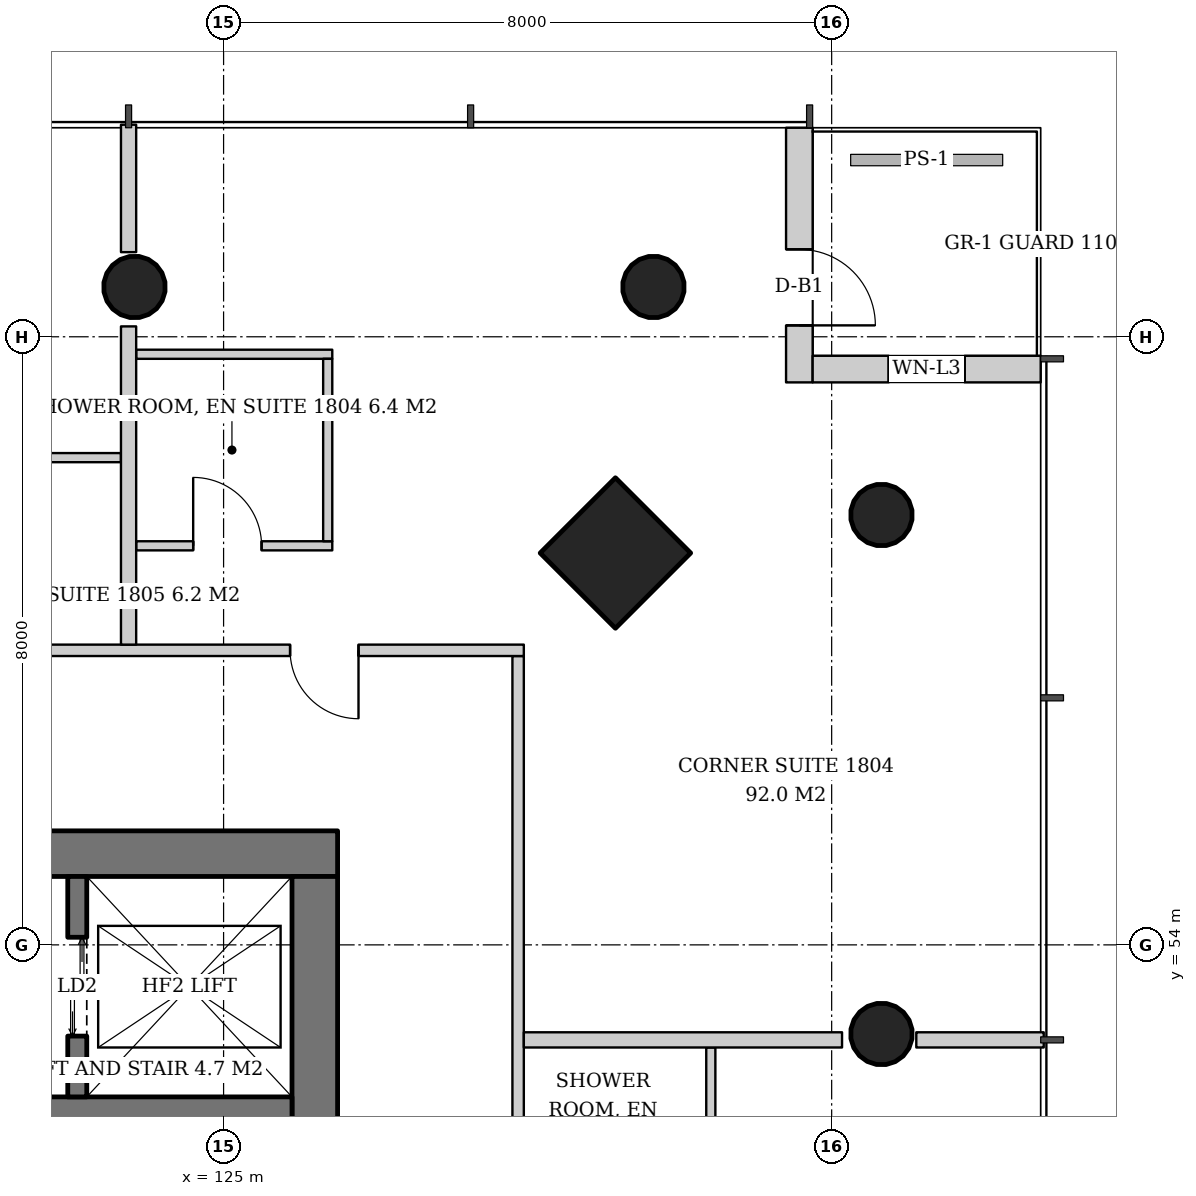
"""IFC4 building model, lengths in metres.
Left out: names, types, materials, properties, quantities, classifications, styles, units other than length and angle.
Written with IfcOpenShell. Run it as: python <this file> out.ifc"""

import sys

from ifc_helpers import new_model, si_unit, direction, frame, frame_2d, origin, origin_2d, place, context, subcontext, project, spatial, rectangle, hollow_circle, extrude, element, fill, save


model = new_model("IFC4")
c1 = context("Model", 3, precision=1e-05, world=origin(), true_north=direction((0.0, 1.0)))
c2 = subcontext(c1, "Body", "Model", "MODEL_VIEW")
j1 = project(units=[si_unit("LENGTHUNIT", "METRE"), si_unit("PLANEANGLEUNIT", "RADIAN")], contexts=[c1])
p1 = place(None, origin())
s1 = spatial("IfcSite", under=j1, at=p1, CompositionType="ELEMENT")
p2 = place(p1, origin())
s2 = spatial("IfcBuilding", under=s1, at=p2, CompositionType="ELEMENT")
p3 = place(p2, frame((0.0, 0.0, 74.2)))
s3 = spatial("IfcBuildingStorey", under=s2, at=p3, CompositionType="ELEMENT", Elevation=74.2)
p4 = place(p3, frame((130.207, 59.207, 0.0), z_axis=(-0.042965756413, -0.042965756413, 0.998152236661), x_axis=(0.707106781187, -0.707106781187, 0.0)))
e1 = element("IfcColumn", 1, at=p4, inside=s3, PredefinedType="COLUMN", context=c2, shape_type="SweptSolid", body=[
    extrude(rectangle(XDim=1.4, YDim=1.4, at=origin_2d()), origin(), (0.0, 0.0, 1.0), 3.807),
])
p5 = place(p3, frame((133.707, 59.707, 0.0), z_axis=(-0.042965756413, -0.042965756413, 0.998152236661), x_axis=(0.707106781187, -0.707106781187, 0.0)))
e2 = element("IfcColumn", 2, at=p5, inside=s3, PredefinedType="COLUMN", context=c2, shape_type="SweptSolid", body=[
    extrude(hollow_circle(Radius=0.406, WallThickness=0.03, at=origin_2d()), origin(), (0.0, 0.0, 1.0), 3.807),
])
p6 = place(p3, frame((133.707, 52.854, 0.0), z_axis=(-0.042995471882, -0.021561908287, 0.998842566929), x_axis=(0.448280611873, -0.89389288677, 0.0)))
e3 = element("IfcColumn", 3, at=p6, inside=s3, PredefinedType="COLUMN", context=c2, shape_type="SweptSolid", body=[
    extrude(hollow_circle(Radius=0.406, WallThickness=0.03, at=origin_2d()), origin(), (0.0, 0.0, 1.0), 3.804),
])
p7 = place(p3, frame((130.707, 62.707, 0.0), z_axis=(-0.042965756413, -0.042965756413, 0.998152236661), x_axis=(0.707106781187, -0.707106781187, 0.0)))
e4 = element("IfcColumn", 4, at=p7, inside=s3, PredefinedType="COLUMN", context=c2, shape_type="SweptSolid", body=[
    extrude(hollow_circle(Radius=0.406, WallThickness=0.03, at=origin_2d()), origin(), (0.0, 0.0, 1.0), 3.807),
])
p8 = place(p3, frame((123.854, 62.707, 0.0), z_axis=(-0.021561908287, -0.042995471882, 0.998842566929), x_axis=(0.89389288677, -0.448280611873, 0.0)))
e5 = element("IfcColumn", 5, at=p8, inside=s3, PredefinedType="COLUMN", context=c2, shape_type="SweptSolid", body=[
    extrude(hollow_circle(Radius=0.406, WallThickness=0.03, at=origin_2d()), origin(), (0.0, 0.0, 1.0), 3.804),
])
p9 = place(p3, frame((107.5, 55.2, 0.0), z_axis=(0.0, 0.0, 1.0), x_axis=(1.0, 0.0, 0.0)))
e6 = element("IfcWall", 6, at=p9, inside=s3, PredefinedType="SHEAR", context=c2, shape_type="SweptSolid", body=[
    extrude(rectangle(XDim=19.0, YDim=0.6, at=frame_2d((9.5, 0.0))), origin(), (0.0, 0.0, 1.0), 3.8),
])
p10 = place(p9, frame((14.14, 0.0, 0.0)))
e7 = element("IfcOpeningElement", 7, at=p10, cuts=e6, PredefinedType="OPENING", context=c2, shape_type="SweptSolid", body=[
    extrude(rectangle(XDim=1.0, YDim=2.1, at=frame_2d((0.5, 1.05))), frame((0.0, 0.31, 0.0), z_axis=(0.0, -1.0, 0.0), x_axis=(1.0, 0.0, 0.0)), (0.0, 0.0, 1.0), 0.62),
])
p11 = place(p9, frame((0.931, 0.0, 0.0)))
e8 = element("IfcOpeningElement", 8, at=p11, cuts=e6, PredefinedType="OPENING", context=c2, shape_type="SweptSolid", body=[
    extrude(rectangle(XDim=1.0, YDim=2.1, at=frame_2d((0.5, 1.05))), frame((0.0, 0.31, 0.0), z_axis=(0.0, -1.0, 0.0), x_axis=(1.0, 0.0, 0.0)), (0.0, 0.0, 1.0), 0.62),
])
p12 = place(p9, frame((2.448, 0.0, 0.0)))
e9 = element("IfcOpeningElement", 9, at=p12, cuts=e6, PredefinedType="OPENING", context=c2, shape_type="SweptSolid", body=[
    extrude(rectangle(XDim=1.0, YDim=2.1, at=frame_2d((0.5, 1.05))), frame((0.0, 0.31, 0.0), z_axis=(0.0, -1.0, 0.0), x_axis=(1.0, 0.0, 0.0)), (0.0, 0.0, 1.0), 0.62),
])
p13 = place(p9, frame((3.983, 0.0, 0.0)))
e10 = element("IfcOpeningElement", 10, at=p13, cuts=e6, PredefinedType="OPENING", context=c2, shape_type="SweptSolid", body=[
    extrude(rectangle(XDim=1.0, YDim=2.1, at=frame_2d((0.5, 1.05))), frame((0.0, 0.31, 0.0), z_axis=(0.0, -1.0, 0.0), x_axis=(1.0, 0.0, 0.0)), (0.0, 0.0, 1.0), 0.62),
])
p14 = place(p3, frame((126.2, 37.1, 0.0), z_axis=(0.0, 0.0, 1.0), x_axis=(0.0, 1.0, 0.0)))
e11 = element("IfcWall", 11, at=p14, inside=s3, PredefinedType="SHEAR", context=c2, shape_type="SweptSolid", body=[
    extrude(rectangle(XDim=17.8, YDim=0.6, at=frame_2d((8.9, 0.0))), origin(), (0.0, 0.0, 1.0), 3.8),
])
p15 = place(p14, frame((8.0, 0.0, 0.0)))
e12 = element("IfcOpeningElement", 12, at=p15, cuts=e11, PredefinedType="OPENING", context=c2, shape_type="SweptSolid", body=[
    extrude(rectangle(XDim=1.8, YDim=2.4, at=frame_2d((0.9, 1.2))), frame((0.0, 0.31, 0.0), z_axis=(0.0, -1.0, 0.0), x_axis=(1.0, 0.0, 0.0)), (0.0, 0.0, 1.0), 0.62),
])
p16 = place(p3, frame((108.1, 51.8, 0.0), z_axis=(0.0, 0.0, 1.0), x_axis=(1.0, 0.0, 0.0)))
e13 = element("IfcWall", 13, at=p16, inside=s3, PredefinedType="SHEAR", context=c2, shape_type="SweptSolid", body=[
    extrude(rectangle(XDim=17.8, YDim=0.4, at=frame_2d((8.9, 0.0))), origin(), (0.0, 0.0, 1.0), 3.8),
])
p17 = place(p3, frame((132.575, 64.75, 0.0), z_axis=(0.0, 0.0, 1.0), x_axis=(0.0, -1.0, 0.0)))
e14 = element("IfcWall", 14, at=p17, inside=s3, PredefinedType="SOLIDWALL", context=c2, shape_type="SweptSolid", body=[
    extrude(rectangle(XDim=3.35, YDim=0.35, at=frame_2d((1.675, 0.0))), origin(), (0.0, 0.0, 1.0), 3.6),
])
p18 = place(p17, frame((1.6, 0.0, 0.0)))
e15 = element("IfcOpeningElement", 15, at=p18, cuts=e14, PredefinedType="OPENING", context=c2, shape_type="SweptSolid", body=[
    extrude(rectangle(XDim=1.0, YDim=2.4, at=frame_2d((0.5, 1.2))), frame((0.0, 0.185, 0.0), z_axis=(0.0, -1.0, 0.0), x_axis=(1.0, 0.0, 0.0)), (0.0, 0.0, 1.0), 0.37),
])
p19 = place(p3, frame((132.75, 61.575, 0.0), z_axis=(0.0, 0.0, 1.0), x_axis=(1.0, 0.0, 0.0)))
e16 = element("IfcWall", 16, at=p19, inside=s3, PredefinedType="SOLIDWALL", context=c2, shape_type="SweptSolid", body=[
    extrude(rectangle(XDim=3.0, YDim=0.35, at=frame_2d((1.5, 0.0))), origin(), (0.0, 0.0, 1.0), 3.6),
])
p20 = place(p19, frame((1.0, 0.0, 0.9)))
e17 = element("IfcOpeningElement", 17, at=p20, cuts=e16, PredefinedType="OPENING", context=c2, shape_type="SweptSolid", body=[
    extrude(rectangle(XDim=1.0, YDim=2.4, at=frame_2d((0.5, 1.2))), frame((0.0, 0.185, 0.0), z_axis=(0.0, -1.0, 0.0), x_axis=(1.0, 0.0, 0.0)), (0.0, 0.0, 1.0), 0.37),
])
p21 = place(p3, frame((123.075, 52.0, 0.0), z_axis=(0.0, 0.0, 1.0), x_axis=(0.0, 1.0, 0.0)))
e18 = element("IfcWall", 18, at=p21, inside=s3, PredefinedType="SHEAR", context=c2, shape_type="SweptSolid", body=[
    extrude(rectangle(XDim=2.9, YDim=0.25, at=frame_2d((1.45, 0.0))), origin(), (0.0, 0.0, 1.0), 3.8),
])
p22 = place(p21, frame((0.8, 0.0, 0.0)))
e19 = element("IfcOpeningElement", 19, at=p22, cuts=e18, PredefinedType="OPENING", context=c2, shape_type="SweptSolid", body=[
    extrude(rectangle(XDim=1.3, YDim=2.2, at=frame_2d((0.65, 1.1))), frame((0.0, 0.135, 0.0), z_axis=(0.0, -1.0, 0.0), x_axis=(1.0, 0.0, 0.0)), (0.0, 0.0, 1.0), 0.27),
])
p23 = place(p3, frame((131.41, 49.93, 0.0), z_axis=(0.0, 0.0, 1.0), x_axis=(0.0, 1.0, 0.0)))
e20 = element("IfcWall", 20, at=p23, inside=s3, PredefinedType="PARTITIONING", context=c2, shape_type="SweptSolid", body=[
    extrude(rectangle(XDim=2.72, YDim=0.12, at=frame_2d((1.36, 0.0))), origin(), (0.0, 0.0, 1.0), 3.6),
])
p24 = place(p3, frame((128.875, 34.05, 0.0), z_axis=(0.0, 0.0, 1.0), x_axis=(0.0, 1.0, 0.0)))
e21 = element("IfcWall", 21, at=p24, inside=s3, PredefinedType="PARTITIONING", context=c2, shape_type="SweptSolid", body=[
    extrude(rectangle(XDim=23.75, YDim=0.15, at=frame_2d((11.875, 0.0))), origin(), (0.0, 0.0, 1.0), 2.8),
])
p25 = place(p24, frame((2.175, 0.0, 0.0)))
e22 = element("IfcOpeningElement", 22, at=p25, cuts=e21, PredefinedType="OPENING", context=c2, shape_type="SweptSolid", body=[
    extrude(rectangle(XDim=0.9, YDim=2.1, at=frame_2d((0.45, 1.05))), frame((0.0, 0.085, 0.0), z_axis=(0.0, -1.0, 0.0), x_axis=(1.0, 0.0, 0.0)), (0.0, 0.0, 1.0), 0.17),
])
p26 = place(p24, frame((7.95, 0.0, 0.0)))
e23 = element("IfcOpeningElement", 23, at=p26, cuts=e21, PredefinedType="OPENING", context=c2, shape_type="SweptSolid", body=[
    extrude(rectangle(XDim=0.9, YDim=2.1, at=frame_2d((0.45, 1.05))), frame((0.0, 0.085, 0.0), z_axis=(0.0, -1.0, 0.0), x_axis=(1.0, 0.0, 0.0)), (0.0, 0.0, 1.0), 0.17),
])
p27 = place(p24, frame((14.8, 0.0, 0.0)))
e24 = element("IfcOpeningElement", 24, at=p27, cuts=e21, PredefinedType="OPENING", context=c2, shape_type="SweptSolid", body=[
    extrude(rectangle(XDim=0.9, YDim=2.1, at=frame_2d((0.45, 1.05))), frame((0.0, 0.085, 0.0), z_axis=(0.0, -1.0, 0.0), x_axis=(1.0, 0.0, 0.0)), (0.0, 0.0, 1.0), 0.17),
])
p28 = place(p3, frame((128.95, 52.75, 0.0), z_axis=(0.0, 0.0, 1.0), x_axis=(1.0, 0.0, 0.0)))
e25 = element("IfcWall", 25, at=p28, inside=s3, PredefinedType="PARTITIONING", context=c2, shape_type="SweptSolid", body=[
    extrude(rectangle(XDim=4.187, YDim=0.2, at=frame_2d((2.093, 0.0))), origin(), (0.0, 0.0, 1.0), 3.6),
])
p29 = place(p3, frame((134.113, 52.75, 0.0), z_axis=(0.0, 0.0, 1.0), x_axis=(1.0, 0.0, 0.0)))
e26 = element("IfcWall", 26, at=p29, inside=s3, PredefinedType="PARTITIONING", context=c2, shape_type="SweptSolid", body=[
    extrude(rectangle(XDim=1.677, YDim=0.2, at=frame_2d((0.838, 0.0))), origin(), (0.0, 0.0, 1.0), 3.6),
])
p30 = place(p3, frame((123.85, 59.25, 0.0), z_axis=(0.0, 0.0, 1.0), x_axis=(1.0, 0.0, 0.0)))
e27 = element("IfcWall", 27, at=p30, inside=s3, PredefinedType="PARTITIONING", context=c2, shape_type="SweptSolid", body=[
    extrude(rectangle(XDim=2.58, YDim=0.12, at=frame_2d((1.29, 0.0))), origin(), (0.0, 0.0, 1.0), 2.8),
])
p31 = place(p30, frame((0.75, 0.0, 0.0)))
e28 = element("IfcOpeningElement", 28, at=p31, cuts=e27, PredefinedType="OPENING", context=c2, shape_type="SweptSolid", body=[
    extrude(rectangle(XDim=0.9, YDim=2.1, at=frame_2d((0.45, 1.05))), frame((0.0, 0.07, 0.0), z_axis=(0.0, -1.0, 0.0), x_axis=(1.0, 0.0, 0.0)), (0.0, 0.0, 1.0), 0.14),
])
p32 = place(p3, frame((123.85, 61.77, 0.0), z_axis=(0.0, 0.0, 1.0), x_axis=(1.0, 0.0, 0.0)))
e29 = element("IfcWall", 29, at=p32, inside=s3, PredefinedType="PARTITIONING", context=c2, shape_type="SweptSolid", body=[
    extrude(rectangle(XDim=2.58, YDim=0.12, at=frame_2d((1.29, 0.0))), origin(), (0.0, 0.0, 1.0), 2.8),
])
p33 = place(p3, frame((126.37, 59.31, 0.0), z_axis=(0.0, 0.0, 1.0), x_axis=(0.0, 1.0, 0.0)))
e30 = element("IfcWall", 30, at=p33, inside=s3, PredefinedType="PARTITIONING", context=c2, shape_type="SweptSolid", body=[
    extrude(rectangle(XDim=2.4, YDim=0.12, at=frame_2d((1.2, 0.0))), origin(), (0.0, 0.0, 1.0), 2.8),
])
p34 = place(p3, frame((123.65, 60.41, 0.0), z_axis=(0.0, 0.0, 1.0), x_axis=(-1.0, 0.0, 0.0)))
e31 = element("IfcWall", 31, at=p34, inside=s3, PredefinedType="PARTITIONING", context=c2, shape_type="SweptSolid", body=[
    extrude(rectangle(XDim=2.42, YDim=0.12, at=frame_2d((1.21, 0.0))), origin(), (0.0, 0.0, 1.0), 2.847),
])
p35 = place(p3, frame((128.95, 57.875, 0.0), z_axis=(0.0, 0.0, 1.0), x_axis=(-1.0, 0.0, 0.0)))
e32 = element("IfcWall", 32, at=p35, inside=s3, PredefinedType="PARTITIONING", context=c2, shape_type="SweptSolid", body=[
    extrude(rectangle(XDim=23.75, YDim=0.15, at=frame_2d((11.875, 0.0))), origin(), (0.0, 0.0, 1.0), 2.8),
])
p36 = place(p35, frame((2.175, 0.0, 0.0)))
e33 = element("IfcOpeningElement", 33, at=p36, cuts=e32, PredefinedType="OPENING", context=c2, shape_type="SweptSolid", body=[
    extrude(rectangle(XDim=0.9, YDim=2.1, at=frame_2d((0.45, 1.05))), frame((0.0, 0.085, 0.0), z_axis=(0.0, -1.0, 0.0), x_axis=(1.0, 0.0, 0.0)), (0.0, 0.0, 1.0), 0.17),
])
p37 = place(p35, frame((7.95, 0.0, 0.0)))
e34 = element("IfcOpeningElement", 34, at=p37, cuts=e32, PredefinedType="OPENING", context=c2, shape_type="SweptSolid", body=[
    extrude(rectangle(XDim=0.9, YDim=2.1, at=frame_2d((0.45, 1.05))), frame((0.0, 0.085, 0.0), z_axis=(0.0, -1.0, 0.0), x_axis=(1.0, 0.0, 0.0)), (0.0, 0.0, 1.0), 0.17),
])
p38 = place(p35, frame((16.95, 0.0, 0.0)))
e35 = element("IfcOpeningElement", 35, at=p38, cuts=e32, PredefinedType="OPENING", context=c2, shape_type="SweptSolid", body=[
    extrude(rectangle(XDim=0.9, YDim=2.1, at=frame_2d((0.45, 1.05))), frame((0.0, 0.085, 0.0), z_axis=(0.0, -1.0, 0.0), x_axis=(1.0, 0.0, 0.0)), (0.0, 0.0, 1.0), 0.17),
])
p39 = place(p3, frame((123.75, 57.95, 0.0), z_axis=(0.0, 0.0, 1.0), x_axis=(0.0, 1.0, 0.0)))
e36 = element("IfcWall", 36, at=p39, inside=s3, PredefinedType="PARTITIONING", context=c2, shape_type="SweptSolid", body=[
    extrude(rectangle(XDim=4.187, YDim=0.2, at=frame_2d((2.093, 0.0))), origin(), (0.0, 0.0, 1.0), 3.6),
])
p40 = place(p3, frame((123.75, 63.113, 0.0), z_axis=(0.0, 0.0, 1.0), x_axis=(0.0, 1.0, 0.0)))
e37 = element("IfcWall", 37, at=p40, inside=s3, PredefinedType="PARTITIONING", context=c2, shape_type="SweptSolid", body=[
    extrude(rectangle(XDim=1.677, YDim=0.2, at=frame_2d((0.838, 0.0))), origin(), (0.0, 0.0, 1.0), 3.6),
])
p41 = place(p18, origin())
e38 = element("IfcDoor", 38, at=p41, inside=s3, OperationType="SINGLE_SWING_RIGHT", PredefinedType="DOOR", context=c2, shape_type="SweptSolid", body=[
    extrude(rectangle(XDim=1.0, YDim=2.4, at=frame_2d((0.5, 1.2))), frame((0.0, 0.025, 0.0), z_axis=(0.0, -1.0, 0.0), x_axis=(1.0, 0.0, 0.0)), (0.0, 0.0, 1.0), 0.05),
])
fill(e15, e38)
p42 = place(p20, origin())
e39 = element("IfcWindow", 39, at=p42, inside=s3, PartitioningType="SINGLE_PANEL", PredefinedType="WINDOW", context=c2, shape_type="SweptSolid", body=[
    extrude(rectangle(XDim=1.0, YDim=2.4, at=frame_2d((0.5, 1.2))), frame((0.0, 0.03, 0.0), z_axis=(0.0, -1.0, 0.0), x_axis=(1.0, 0.0, 0.0)), (0.0, 0.0, 1.0), 0.06),
])
fill(e17, e39)
p43 = place(p22, origin())
e40 = element("IfcDoor", 40, at=p43, inside=s3, OperationType="DOUBLE_DOOR_SLIDING", PredefinedType="DOOR", context=c2, shape_type="SweptSolid", body=[
    extrude(rectangle(XDim=1.3, YDim=2.2, at=frame_2d((0.65, 1.1))), frame((0.0, 0.025, 0.0), z_axis=(0.0, -1.0, 0.0), x_axis=(1.0, 0.0, 0.0)), (0.0, 0.0, 1.0), 0.05),
])
fill(e19, e40)
p44 = place(p31, origin())
e41 = element("IfcDoor", 41, at=p44, inside=s3, OperationType="SINGLE_SWING_LEFT", PredefinedType="DOOR", context=c2, shape_type="SweptSolid", body=[
    extrude(rectangle(XDim=0.9, YDim=2.1, at=frame_2d((0.45, 1.05))), frame((0.0, 0.025, 0.0), z_axis=(0.0, -1.0, 0.0), x_axis=(1.0, 0.0, 0.0)), (0.0, 0.0, 1.0), 0.05),
])
fill(e28, e41)
p45 = place(p36, origin())
e42 = element("IfcDoor", 42, at=p45, inside=s3, OperationType="SINGLE_SWING_LEFT", PredefinedType="DOOR", context=c2, shape_type="SweptSolid", body=[
    extrude(rectangle(XDim=0.9, YDim=2.1, at=frame_2d((0.45, 1.05))), frame((0.0, 0.025, 0.0), z_axis=(0.0, -1.0, 0.0), x_axis=(1.0, 0.0, 0.0)), (0.0, 0.0, 1.0), 0.05),
])
fill(e33, e42)
save(model, sys.argv[1])
